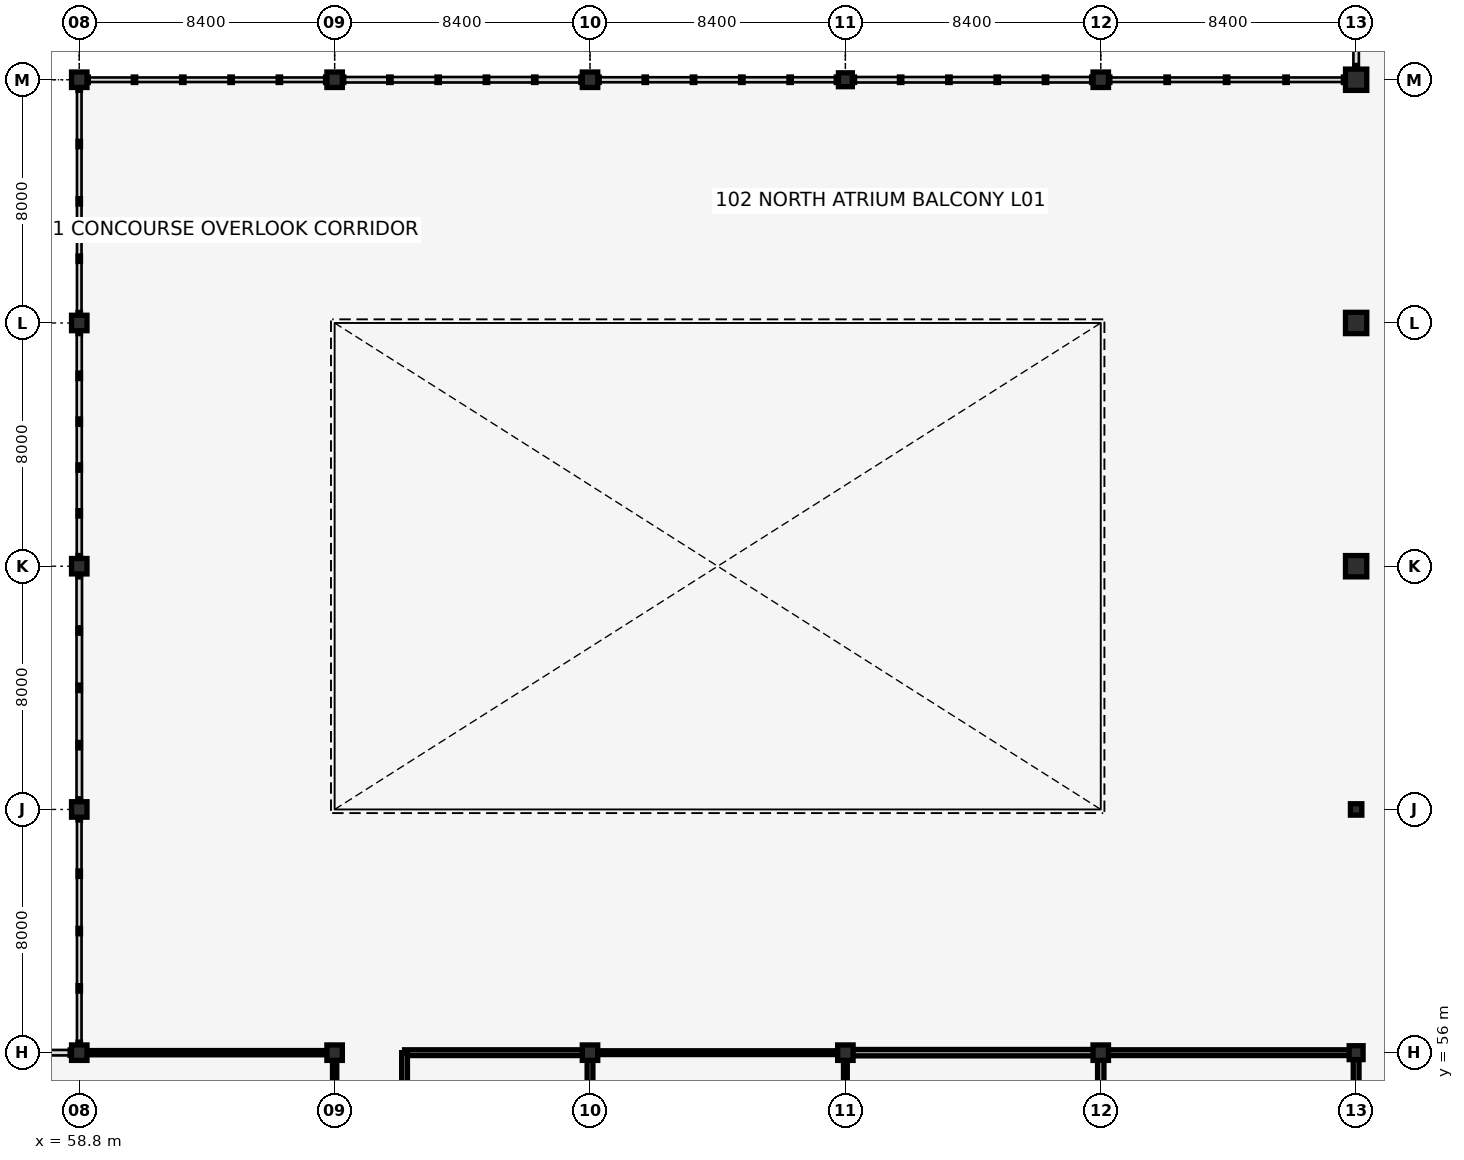
"""IFC4 building model, lengths in metres.
Left out: names, types, materials, properties, quantities, classifications, styles, units other than length and angle.
Written with IfcOpenShell. Run it as: python <this file> out.ifc"""

import sys

from ifc_helpers import new_model, si_unit, direction, frame, frame_2d, origin, origin_2d, place, context, subcontext, project, spatial, rectangle, hollow_circle, i_section, extrude, element, save


model = new_model("IFC4")
c1 = context("Model", 3, precision=1e-05, world=origin(), true_north=direction((0.0, 1.0)))
c2 = subcontext(c1, "Body", "Model", "MODEL_VIEW")
j1 = project(units=[si_unit("LENGTHUNIT", "METRE"), si_unit("PLANEANGLEUNIT", "RADIAN")], contexts=[c1])
p1 = place(None, origin())
s1 = spatial("IfcSite", under=j1, at=p1, CompositionType="ELEMENT")
p2 = place(p1, origin())
s2 = spatial("IfcBuilding", under=s1, at=p2, CompositionType="ELEMENT")
p3 = place(p2, frame((0.0, 0.0, 5.44)))
s3 = spatial("IfcBuildingStorey", under=s2, at=p3, CompositionType="ELEMENT", Elevation=5.44)
p4 = place(p3, frame((58.8, 56.0, 0.0), z_axis=(0.0, 0.0, 1.0), x_axis=(1.0, 0.0, 0.0)))
e1 = element("IfcColumn", 1, at=p4, inside=s3, PredefinedType="COLUMN", context=c2, shape_type="SweptSolid", body=[
    extrude(hollow_circle(Radius=0.229, WallThickness=0.016, at=origin_2d()), origin(), (0.0, 0.0, 1.0), 16.28),
])
p5 = place(p3, frame((58.8, 64.0, 0.0), z_axis=(0.0, 0.0, 1.0), x_axis=(1.0, 0.0, 0.0)))
e2 = element("IfcColumn", 2, at=p5, inside=s3, PredefinedType="COLUMN", context=c2, shape_type="SweptSolid", body=[
    extrude(hollow_circle(Radius=0.229, WallThickness=0.016, at=origin_2d()), origin(), (0.0, 0.0, 1.0), 18.23),
])
p6 = place(p3, frame((58.8, 72.0, 0.0), z_axis=(0.0, 0.0, 1.0), x_axis=(1.0, 0.0, 0.0)))
e3 = element("IfcColumn", 3, at=p6, inside=s3, PredefinedType="COLUMN", context=c2, shape_type="SweptSolid", body=[
    extrude(hollow_circle(Radius=0.229, WallThickness=0.016, at=origin_2d()), origin(), (0.0, 0.0, 1.0), 18.88),
])
p7 = place(p3, frame((58.8, 80.0, 0.0), z_axis=(0.0, 0.0, 1.0), x_axis=(1.0, 0.0, 0.0)))
e4 = element("IfcColumn", 4, at=p7, inside=s3, PredefinedType="COLUMN", context=c2, shape_type="SweptSolid", body=[
    extrude(hollow_circle(Radius=0.229, WallThickness=0.016, at=origin_2d()), origin(), (0.0, 0.0, 1.0), 18.23),
])
p8 = place(p3, frame((58.8, 88.0, 0.0), z_axis=(0.0, 0.0, 1.0), x_axis=(1.0, 0.0, 0.0)))
e5 = element("IfcColumn", 5, at=p8, inside=s3, PredefinedType="COLUMN", context=c2, shape_type="SweptSolid", body=[
    extrude(hollow_circle(Radius=0.229, WallThickness=0.016, at=origin_2d()), origin(), (0.0, 0.0, 1.0), 16.28),
])
for number, where, z_axis, x_axis in (
    (6, (67.2, 56.0, 0.0), (0.0, 0.0, 1.0), (1.0, 0.0, 0.0)),
    (7, (67.2, 88.0, 0.0), (0.0, 0.0, 1.0), (1.0, 0.0, 0.0)),
):
    element("IfcColumn", number, at=place(p3, frame(where, z_axis=z_axis, x_axis=x_axis)), inside=s3, PredefinedType="COLUMN", context=c2, shape_type="SweptSolid", body=[
        extrude(hollow_circle(Radius=0.229, WallThickness=0.016, at=origin_2d()), origin(), (0.0, 0.0, 1.0), 12.952),
    ])
for number, where, z_axis, x_axis in (
    (8, (75.6, 56.0, 0.0), (0.0, 0.0, 1.0), (1.0, 0.0, 0.0)),
    (9, (75.6, 88.0, 0.0), (0.0, 0.0, 1.0), (1.0, 0.0, 0.0)),
    (10, (84.0, 56.0, 0.0), (0.0, 0.0, 1.0), (1.0, 0.0, 0.0)),
):
    element("IfcColumn", number, at=place(p3, frame(where, z_axis=z_axis, x_axis=x_axis)), inside=s3, PredefinedType="COLUMN", context=c2, shape_type="SweptSolid", body=[
        extrude(hollow_circle(Radius=0.229, WallThickness=0.016, at=origin_2d()), origin(), (0.0, 0.0, 1.0), 11.288),
    ])
p9 = place(p3, frame((84.0, 88.0, 0.0), z_axis=(0.0, 0.0, 1.0), x_axis=(1.0, 0.0, 0.0)))
e11 = element("IfcColumn", 11, at=p9, inside=s3, PredefinedType="COLUMN", context=c2, shape_type="SweptSolid", body=[
    extrude(hollow_circle(Radius=0.229, WallThickness=0.016, at=origin_2d()), origin(), (0.0, 0.0, 1.0), 11.318),
])
for number, where, z_axis, x_axis in (
    (12, (92.4, 56.0, 0.0), (0.0, 0.0, 1.0), (1.0, 0.0, 0.0)),
    (13, (92.4, 88.0, 0.0), (0.0, 0.0, 1.0), (1.0, 0.0, 0.0)),
):
    element("IfcColumn", number, at=place(p3, frame(where, z_axis=z_axis, x_axis=x_axis)), inside=s3, PredefinedType="COLUMN", context=c2, shape_type="SweptSolid", body=[
        extrude(hollow_circle(Radius=0.229, WallThickness=0.016, at=origin_2d()), origin(), (0.0, 0.0, 1.0), 12.952),
    ])
p10 = place(p3, frame((100.8, 56.0, 0.0), z_axis=(0.0, 0.0, 1.0), x_axis=(1.0, 0.0, 0.0)))
e14 = element("IfcColumn", 14, at=p10, inside=s3, PredefinedType="COLUMN", context=c2, shape_type="SweptSolid", body=[
    extrude(hollow_circle(Radius=0.229, WallThickness=0.016, at=origin_2d()), origin(), (0.0, 0.0, 1.0), 16.31),
])
p11 = place(p3, frame((100.8, 64.0, 0.0), z_axis=(0.0, 0.0, 1.0), x_axis=(1.0, 0.0, 0.0)))
e15 = element("IfcColumn", 15, at=p11, inside=s3, PredefinedType="COLUMN", context=c2, shape_type="SweptSolid", body=[
    extrude(i_section(OverallWidth=0.375, OverallDepth=0.375, WebThickness=0.017, FlangeThickness=0.027, FilletRadius=0.015, at=origin_2d()), origin(), (0.0, 0.0, 1.0), 3.8),
])
for number, where, z_axis, x_axis in (
    (16, (100.8, 72.0, 0.0), (0.0, 0.0, 1.0), (1.0, 0.0, 0.0)),
    (17, (100.8, 80.0, 0.0), (0.0, 0.0, 1.0), (1.0, 0.0, 0.0)),
    (18, (100.8, 88.0, 0.0), (0.0, 0.0, 1.0), (1.0, 0.0, 0.0)),
):
    element("IfcColumn", number, at=place(p3, frame(where, z_axis=z_axis, x_axis=x_axis)), inside=s3, PredefinedType="COLUMN", context=c2, shape_type="SweptSolid", body=[
        extrude(rectangle(XDim=0.7, YDim=0.7, at=origin_2d()), origin(), (0.0, 0.0, 1.0), 3.8),
    ])
p12 = place(p3, frame((58.8, 56.0, 16.33), z_axis=(-0.104849381236, -0.104849381236, 0.988945506339), x_axis=(0.707106781187, -0.707106781187, 0.0)))
e19 = element("IfcColumn", 19, at=p12, inside=s3, PredefinedType="COLUMN", context=c2, shape_type="SweptSolid", body=[
    extrude(hollow_circle(Radius=0.254, WallThickness=0.02, at=origin_2d()), origin(), (0.0, 0.0, 1.0), 2.862),
])
p13 = place(p3, frame((58.8, 64.0, 18.28), z_axis=(-0.105430502232, 0.0, 0.994426673616), x_axis=(0.0, -1.0, 0.0)))
e20 = element("IfcColumn", 20, at=p13, inside=s3, PredefinedType="COLUMN", context=c2, shape_type="SweptSolid", body=[
    extrude(hollow_circle(Radius=0.254, WallThickness=0.02, at=origin_2d()), origin(), (0.0, 0.0, 1.0), 2.846),
])
p14 = place(p3, frame((58.8, 72.0, 18.93), z_axis=(-0.105439497006, 0.0, 0.994425719936), x_axis=(0.0, -1.0, 0.0)))
e21 = element("IfcColumn", 21, at=p14, inside=s3, PredefinedType="COLUMN", context=c2, shape_type="SweptSolid", body=[
    extrude(hollow_circle(Radius=0.254, WallThickness=0.02, at=origin_2d()), origin(), (0.0, 0.0, 1.0), 2.846),
])
p15 = place(p3, frame((58.8, 80.0, 18.28), z_axis=(-0.105430502232, 0.0, 0.994426673616), x_axis=(0.0, -1.0, 0.0)))
e22 = element("IfcColumn", 22, at=p15, inside=s3, PredefinedType="COLUMN", context=c2, shape_type="SweptSolid", body=[
    extrude(hollow_circle(Radius=0.254, WallThickness=0.02, at=origin_2d()), origin(), (0.0, 0.0, 1.0), 2.846),
])
p16 = place(p3, frame((58.8, 88.0, 16.33), z_axis=(-0.104849381236, 0.104849381236, 0.988945506339), x_axis=(-0.707106781187, -0.707106781187, 0.0)))
e23 = element("IfcColumn", 23, at=p16, inside=s3, PredefinedType="COLUMN", context=c2, shape_type="SweptSolid", body=[
    extrude(hollow_circle(Radius=0.254, WallThickness=0.02, at=origin_2d()), origin(), (0.0, 0.0, 1.0), 2.862),
])
p17 = place(p3, frame((67.2, 56.0, 13.002), z_axis=(0.0, -0.105430502232, 0.994426673616), x_axis=(1.0, 0.0, 0.0)))
e24 = element("IfcColumn", 24, at=p17, inside=s3, PredefinedType="COLUMN", context=c2, shape_type="SweptSolid", body=[
    extrude(hollow_circle(Radius=0.254, WallThickness=0.02, at=origin_2d()), origin(), (0.0, 0.0, 1.0), 2.846),
])
for number, where, z_axis, x_axis in (
    (25, (75.6, 56.0, 11.338), (0.0, -0.105, 0.994), (1.0, 0.0, 0.0)),
    (26, (84.0, 56.0, 11.338), (0.0, -0.105, 0.994), (1.0, 0.0, 0.0)),
):
    element("IfcColumn", number, at=place(p3, frame(where, z_axis=z_axis, x_axis=x_axis)), inside=s3, PredefinedType="COLUMN", context=c2, shape_type="SweptSolid", body=[
        extrude(hollow_circle(Radius=0.254, WallThickness=0.02, at=origin_2d()), origin(), (0.0, 0.0, 1.0), 2.846),
    ])
for number, where, z_axis, x_axis in (
    (27, (92.4, 56.0, 13.002), (0.0, -0.105, 0.994), (1.0, 0.0, 0.0)),
    (28, (67.2, 88.0, 13.002), (0.0, 0.105, 0.994), (-1.0, 0.0, 0.0)),
):
    element("IfcColumn", number, at=place(p3, frame(where, z_axis=z_axis, x_axis=x_axis)), inside=s3, PredefinedType="COLUMN", context=c2, shape_type="SweptSolid", body=[
        extrude(hollow_circle(Radius=0.254, WallThickness=0.02, at=origin_2d()), origin(), (0.0, 0.0, 1.0), 2.846),
    ])
p18 = place(p3, frame((75.6, 88.0, 11.338), z_axis=(0.0, 0.105439497006, 0.994425719936), x_axis=(-1.0, 0.0, 0.0)))
e29 = element("IfcColumn", 29, at=p18, inside=s3, PredefinedType="COLUMN", context=c2, shape_type="SweptSolid", body=[
    extrude(hollow_circle(Radius=0.254, WallThickness=0.02, at=origin_2d()), origin(), (0.0, 0.0, 1.0), 2.846),
])
p19 = place(p3, frame((92.4, 88.0, 13.002), z_axis=(0.0, 0.105430502232, 0.994426673616), x_axis=(-1.0, 0.0, 0.0)))
e30 = element("IfcColumn", 30, at=p19, inside=s3, PredefinedType="COLUMN", context=c2, shape_type="SweptSolid", body=[
    extrude(hollow_circle(Radius=0.254, WallThickness=0.02, at=origin_2d()), origin(), (0.0, 0.0, 1.0), 2.846),
])
p20 = place(p3, frame((59.019, 56.0, 0.0), z_axis=(0.0, 0.0, 1.0), x_axis=(1.0, 0.0, 0.0)))
e31 = element("IfcWall", 31, at=p20, inside=s3, PredefinedType="PARTITIONING", context=c2, shape_type="SweptSolid", body=[
    extrude(rectangle(XDim=7.963, YDim=0.14, at=frame_2d((3.981, 0.0))), origin(), (0.0, 0.0, 1.0), 3.8),
])
p21 = place(p3, frame((67.2, 48.15, 0.0), z_axis=(0.0, 0.0, 1.0), x_axis=(0.0, 1.0, 0.0)))
e32 = element("IfcWall", 32, at=p21, inside=s3, PredefinedType="PARTITIONING", context=c2, shape_type="SweptSolid", body=[
    extrude(rectangle(XDim=7.631, YDim=0.14, at=frame_2d((3.815, 0.0))), origin(), (0.0, 0.0, 1.0), 3.337),
])
p22 = place(p3, frame((69.5, 56.0, 0.0), z_axis=(0.0, 0.0, 1.0), x_axis=(1.0, 0.0, 0.0)))
e33 = element("IfcWall", 33, at=p22, inside=s3, PredefinedType="PLUMBINGWALL", context=c2, shape_type="SweptSolid", body=[
    extrude(rectangle(XDim=5.882, YDim=0.19, at=frame_2d((2.941, 0.0))), origin(), (0.0, 0.0, 1.0), 3.8),
])
p23 = place(p3, frame((69.5, 42.3, 0.0), z_axis=(0.0, 0.0, 1.0), x_axis=(0.0, 1.0, 0.0)))
e34 = element("IfcWall", 34, at=p23, inside=s3, PredefinedType="PLUMBINGWALL", context=c2, shape_type="SweptSolid", body=[
    extrude(rectangle(XDim=13.7, YDim=0.19, at=frame_2d((6.85, 0.0))), origin(), (0.0, 0.0, 1.0), 3.8),
])
p24 = place(p3, frame((75.6, 48.15, 0.0), z_axis=(0.0, 0.0, 1.0), x_axis=(0.0, 1.0, 0.0)))
e35 = element("IfcWall", 35, at=p24, inside=s3, PredefinedType="PLUMBINGWALL", context=c2, shape_type="SweptSolid", body=[
    extrude(rectangle(XDim=7.631, YDim=0.19, at=frame_2d((3.815, 0.0))), origin(), (0.0, 0.0, 1.0), 3.337),
])
p25 = place(p3, frame((75.819, 56.0, 0.0), z_axis=(0.0, 0.0, 1.0), x_axis=(1.0, 0.0, 0.0)))
e36 = element("IfcWall", 36, at=p25, inside=s3, PredefinedType="PARTITIONING", context=c2, shape_type="SweptSolid", body=[
    extrude(rectangle(XDim=7.963, YDim=0.125, at=frame_2d((3.981, 0.0))), origin(), (0.0, 0.0, 1.0), 3.8),
])
p26 = place(p3, frame((84.0, 48.15, 0.0), z_axis=(0.0, 0.0, 1.0), x_axis=(0.0, 1.0, 0.0)))
e37 = element("IfcWall", 37, at=p26, inside=s3, PredefinedType="PARTITIONING", context=c2, shape_type="SweptSolid", body=[
    extrude(rectangle(XDim=7.631, YDim=0.125, at=frame_2d((3.815, 0.0))), origin(), (0.0, 0.0, 1.0), 3.337),
])
p27 = place(p3, frame((84.219, 56.0, 0.0), z_axis=(0.0, 0.0, 1.0), x_axis=(1.0, 0.0, 0.0)))
e38 = element("IfcWall", 38, at=p27, inside=s3, PredefinedType="PLUMBINGWALL", context=c2, shape_type="SweptSolid", body=[
    extrude(rectangle(XDim=7.963, YDim=0.21, at=frame_2d((3.981, 0.0))), origin(), (0.0, 0.0, 1.0), 3.8),
])
p28 = place(p3, frame((92.4, 48.15, 0.0), z_axis=(0.0, 0.0, 1.0), x_axis=(0.0, 1.0, 0.0)))
e39 = element("IfcWall", 39, at=p28, inside=s3, PredefinedType="PLUMBINGWALL", context=c2, shape_type="SweptSolid", body=[
    extrude(rectangle(XDim=7.631, YDim=0.21, at=frame_2d((3.815, 0.0))), origin(), (0.0, 0.0, 1.0), 3.337),
])
p29 = place(p3, frame((92.618, 56.0, 0.0), z_axis=(0.0, 0.0, 1.0), x_axis=(1.0, 0.0, 0.0)))
e40 = element("IfcWall", 40, at=p29, inside=s3, PredefinedType="PLUMBINGWALL", context=c2, shape_type="SweptSolid", body=[
    extrude(rectangle(XDim=7.963, YDim=0.19, at=frame_2d((3.981, 0.0))), origin(), (0.0, 0.0, 1.0), 3.8),
])
p30 = place(p3, frame((100.8, 48.15, 0.0), z_axis=(0.0, 0.0, 1.0), x_axis=(0.0, 1.0, 0.0)))
e41 = element("IfcWall", 41, at=p30, inside=s3, PredefinedType="PLUMBINGWALL", context=c2, shape_type="SweptSolid", body=[
    extrude(rectangle(XDim=7.631, YDim=0.19, at=frame_2d((3.815, 0.0))), origin(), (0.0, 0.0, 1.0), 3.337),
])
save(model, sys.argv[1])
